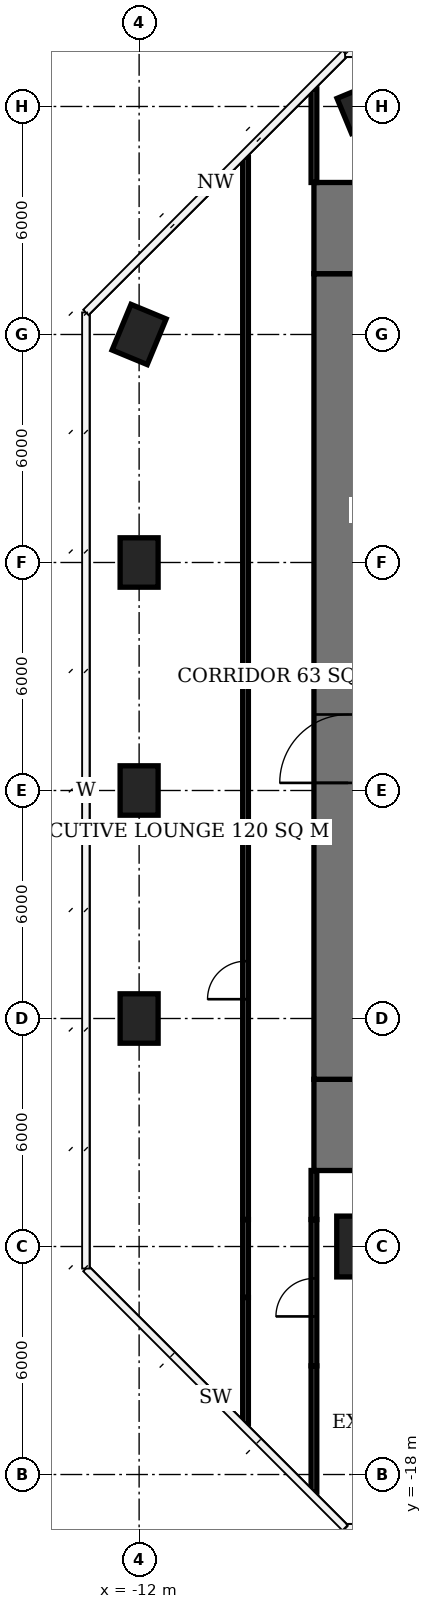
"""IFC4 building model, lengths in metres.
Left out: names, types, materials, properties, quantities, classifications, styles, units other than length and angle.
Written with IfcOpenShell. Run it as: python <this file> out.ifc"""

import sys

from ifc_helpers import new_model, si_unit, direction, frame, frame_2d, origin, origin_2d, place, context, subcontext, project, spatial, rectangle, extrude, element, fill, save


model = new_model("IFC4")
c1 = context("Model", 3, precision=1e-05, world=origin(), true_north=direction((0.0, 1.0)))
c2 = subcontext(c1, "Body", "Model", "MODEL_VIEW")
j1 = project(units=[si_unit("LENGTHUNIT", "METRE"), si_unit("PLANEANGLEUNIT", "RADIAN")], contexts=[c1])
p1 = place(None, origin())
s1 = spatial("IfcSite", under=j1, at=p1, CompositionType="ELEMENT")
p2 = place(p1, origin())
s2 = spatial("IfcBuilding", under=s1, at=p2, CompositionType="ELEMENT")
p3 = place(p2, frame((0.0, 0.0, 272.3)))
s3 = spatial("IfcBuildingStorey", under=s2, at=p3, CompositionType="ELEMENT", Elevation=272.3)
for number, where, z_axis, x_axis in (
    (1, (-12.0, -6.0, 0.0), (0.0, 0.0, 1.0), (0.0, 1.0, 0.0)),
    (2, (-12.0, 0.0, 0.0), (0.0, 0.0, 1.0), (0.0, 1.0, 0.0)),
    (3, (-12.0, 6.0, 0.0), (0.0, 0.0, 1.0), (0.0, 1.0, 0.0)),
    (4, (-12.0, 12.0, 0.0), (0.0, 0.0, 1.0), (0.383, 0.924, 0.0)),
):
    element("IfcColumn", number, at=place(p3, frame(where, z_axis=z_axis, x_axis=x_axis)), inside=s3, PredefinedType="COLUMN", context=c2, shape_type="SweptSolid", body=[
        extrude(rectangle(XDim=1.3, YDim=1.0, at=origin_2d()), origin(), (0.0, 0.0, 1.0), 3.9),
    ])
p4 = place(p3, frame((-6.0, -12.0, 0.0), z_axis=(0.0, 0.0, 1.0), x_axis=(1.0, 0.0, 0.0)))
e5 = element("IfcColumn", 5, at=p4, inside=s3, PredefinedType="COLUMN", context=c2, shape_type="SweptSolid", body=[
    extrude(rectangle(XDim=1.6, YDim=1.6, at=origin_2d()), origin(), (0.0, 0.0, 1.0), 3.9),
])
p5 = place(p3, frame((-6.0, 18.0, 0.0), z_axis=(0.0, 0.0, 1.0), x_axis=(0.923879532511, 0.382683432365, 0.0)))
e6 = element("IfcColumn", 6, at=p5, inside=s3, PredefinedType="COLUMN", context=c2, shape_type="SweptSolid", body=[
    extrude(rectangle(XDim=1.3, YDim=1.0, at=origin_2d()), origin(), (0.0, 0.0, 1.0), 3.9),
])
p6 = place(p3, frame((-6.5, -7.6, 0.0), z_axis=(0.0, 0.0, 1.0), x_axis=(0.0, 1.0, 0.0)))
e7 = element("IfcWall", 7, at=p6, inside=s3, PredefinedType="SHEAR", context=c2, shape_type="SweptSolid", body=[
    extrude(rectangle(XDim=21.2, YDim=1.8, at=frame_2d((10.6, 0.0))), origin(), (0.0, 0.0, 1.0), 3.9),
])
p7 = place(p6, frame((7.8, 0.0, 0.0)))
e8 = element("IfcOpeningElement", 8, at=p7, cuts=e7, PredefinedType="OPENING", context=c2, shape_type="SweptSolid", body=[
    extrude(rectangle(XDim=1.8, YDim=2.4, at=frame_2d((0.9, 1.2))), frame((0.0, 0.91, 0.0), z_axis=(0.0, -1.0, 0.0), x_axis=(1.0, 0.0, 0.0)), (0.0, 0.0, 1.0), 1.82),
])
for number, where, z_axis, x_axis in (
    (9, (-6.5, -10.0, 0.0), (0.0, 0.0, 1.0), (0.0, 1.0, 0.0)),
    (10, (-6.5, 13.6, 0.0), (0.0, 0.0, 1.0), (0.0, 1.0, 0.0)),
):
    element("IfcWall", number, at=place(p3, frame(where, z_axis=z_axis, x_axis=x_axis)), inside=s3, PredefinedType="SHEAR", context=c2, shape_type="SweptSolid", body=[
        extrude(rectangle(XDim=2.4, YDim=1.8, at=frame_2d((1.2, 0.0))), origin(), (0.0, 0.0, 1.0), 3.9),
    ])
p8 = place(p3, frame((-9.2, -16.664, 0.0), z_axis=(0.0, 0.0, 1.0), x_axis=(0.0, 1.0, 0.0)))
e11 = element("IfcWall", 11, at=p8, inside=s3, PredefinedType="PARTITIONING", context=c2, shape_type="SweptSolid", body=[
    extrude(rectangle(XDim=3.324, YDim=0.15, at=frame_2d((1.662, 0.0))), origin(), (0.0, 0.0, 1.0), 3.65),
])
p9 = place(p3, frame((-9.2, -13.34, 0.0), z_axis=(0.0, 0.0, 1.0), x_axis=(0.0, 1.0, 0.0)))
e12 = element("IfcWall", 12, at=p9, inside=s3, PredefinedType="PARTITIONING", context=c2, shape_type="SweptSolid", body=[
    extrude(rectangle(XDim=2.05, YDim=0.15, at=frame_2d((1.025, 0.0))), origin(), (0.0, 0.0, 1.0), 2.65),
])
p10 = place(p3, frame((-9.2, -11.29, 0.0), z_axis=(0.0, 0.0, 1.0), x_axis=(0.0, 1.0, 0.0)))
e13 = element("IfcWall", 13, at=p10, inside=s3, PredefinedType="PARTITIONING", context=c2, shape_type="SweptSolid", body=[
    extrude(rectangle(XDim=27.954, YDim=0.15, at=frame_2d((13.977, 0.0))), origin(), (0.0, 0.0, 1.0), 3.65),
])
p11 = place(p10, frame((5.798, 0.0, 0.0)))
e14 = element("IfcOpeningElement", 14, at=p11, cuts=e13, PredefinedType="OPENING", context=c2, shape_type="SweptSolid", body=[
    extrude(rectangle(XDim=1.0, YDim=2.4, at=frame_2d((0.5, 1.2))), frame((0.0, 0.085, 0.0), z_axis=(0.0, -1.0, 0.0), x_axis=(1.0, 0.0, 0.0)), (0.0, 0.0, 1.0), 0.17),
])
p12 = place(p3, frame((-7.4, -18.464, 0.0), z_axis=(0.0, 0.0, 1.0), x_axis=(0.0, 1.0, 0.0)))
e15 = element("IfcWall", 15, at=p12, inside=s3, PredefinedType="PARTITIONING", context=c2, shape_type="SweptSolid", body=[
    extrude(rectangle(XDim=3.324, YDim=0.15, at=frame_2d((1.662, 0.0))), origin(), (0.0, 0.0, 1.0), 3.65),
])
p13 = place(p3, frame((-7.4, -15.14, 0.0), z_axis=(0.0, 0.0, 1.0), x_axis=(0.0, 1.0, 0.0)))
e16 = element("IfcWall", 16, at=p13, inside=s3, PredefinedType="PARTITIONING", context=c2, shape_type="SweptSolid", body=[
    extrude(rectangle(XDim=3.85, YDim=0.15, at=frame_2d((1.925, 0.0))), origin(), (0.0, 0.0, 1.0), 2.65),
])
p14 = place(p13, frame((1.3, 0.0, 0.0)))
e17 = element("IfcOpeningElement", 17, at=p14, cuts=e16, PredefinedType="OPENING", context=c2, shape_type="SweptSolid", body=[
    extrude(rectangle(XDim=1.0, YDim=2.1, at=frame_2d((0.5, 1.05))), frame((0.0, 0.085, 0.0), z_axis=(0.0, -1.0, 0.0), x_axis=(1.0, 0.0, 0.0)), (0.0, 0.0, 1.0), 0.17),
])
p15 = place(p3, frame((-7.4, -11.29, 0.0), z_axis=(0.0, 0.0, 1.0), x_axis=(0.0, 1.0, 0.0)))
e18 = element("IfcWall", 18, at=p15, inside=s3, PredefinedType="PARTITIONING", context=c2, shape_type="SweptSolid", body=[
    extrude(rectangle(XDim=1.29, YDim=0.15, at=frame_2d((0.645, 0.0))), origin(), (0.0, 0.0, 1.0), 3.65),
])
p16 = place(p3, frame((-7.4, 16.0, 0.0), z_axis=(0.0, 0.0, 1.0), x_axis=(0.0, 1.0, 0.0)))
e19 = element("IfcWall", 19, at=p16, inside=s3, PredefinedType="PARTITIONING", context=c2, shape_type="SweptSolid", body=[
    extrude(rectangle(XDim=2.464, YDim=0.15, at=frame_2d((1.232, 0.0))), origin(), (0.0, 0.0, 1.0), 3.65),
])
p17 = place(p7, origin())
e20 = element("IfcDoor", 20, at=p17, inside=s3, OperationType="DOUBLE_DOOR_SINGLE_SWING", PredefinedType="DOOR", context=c2, shape_type="SweptSolid", body=[
    extrude(rectangle(XDim=1.8, YDim=2.4, at=frame_2d((0.9, 1.2))), frame((0.0, 0.025, 0.0), z_axis=(0.0, -1.0, 0.0), x_axis=(1.0, 0.0, 0.0)), (0.0, 0.0, 1.0), 0.05),
])
fill(e8, e20)
p18 = place(p11, origin())
e21 = element("IfcDoor", 21, at=p18, inside=s3, OperationType="SINGLE_SWING_LEFT", PredefinedType="DOOR", context=c2, shape_type="SweptSolid", body=[
    extrude(rectangle(XDim=1.0, YDim=2.4, at=frame_2d((0.5, 1.2))), frame((0.0, 0.025, 0.0), z_axis=(0.0, -1.0, 0.0), x_axis=(1.0, 0.0, 0.0)), (0.0, 0.0, 1.0), 0.05),
])
fill(e14, e21)
p19 = place(p14, origin())
e22 = element("IfcDoor", 22, at=p19, inside=s3, OperationType="SINGLE_SWING_LEFT", PredefinedType="DOOR", context=c2, shape_type="SweptSolid", body=[
    extrude(rectangle(XDim=1.0, YDim=2.1, at=frame_2d((0.5, 1.05))), frame((0.0, 0.025, 0.0), z_axis=(0.0, -1.0, 0.0), x_axis=(1.0, 0.0, 0.0)), (0.0, 0.0, 1.0), 0.05),
])
fill(e17, e22)
save(model, sys.argv[1])
